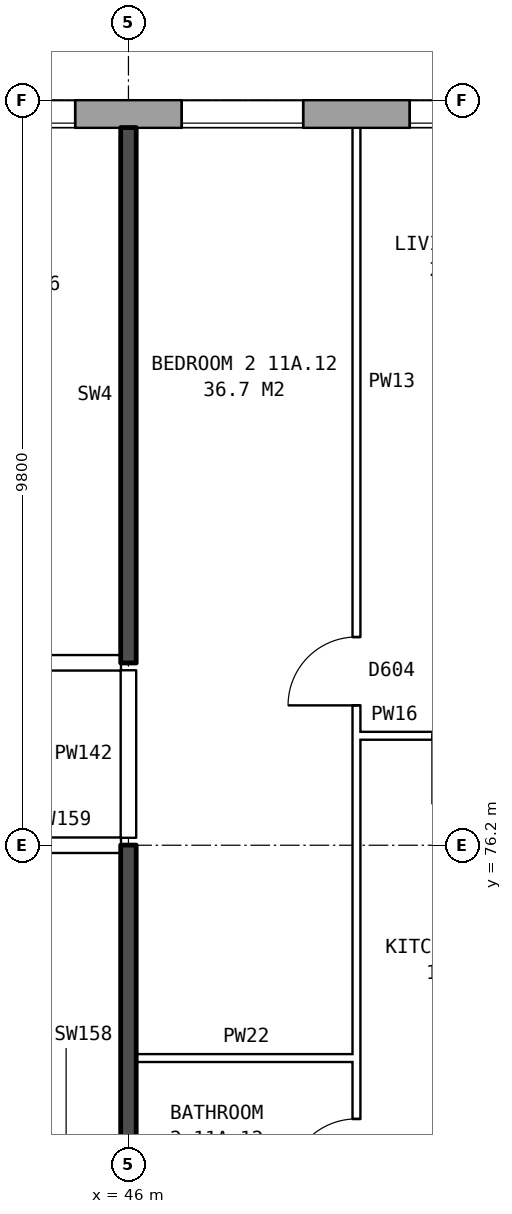
"""IFC4 building model, lengths in metres.
Left out: names, types, materials, properties, quantities, classifications, styles, units other than length and angle.
Written with IfcOpenShell. Run it as: python <this file> out.ifc"""

import sys

from ifc_helpers import new_model, si_unit, direction, frame, frame_2d, origin, place, context, subcontext, project, spatial, rectangle, extrude, element, fill, save


model = new_model("IFC4")
c1 = context("Model", 3, precision=1e-05, world=origin(), true_north=direction((0.0, 1.0)))
c2 = subcontext(c1, "Body", "Model", "MODEL_VIEW")
j1 = project(units=[si_unit("LENGTHUNIT", "METRE"), si_unit("PLANEANGLEUNIT", "RADIAN")], contexts=[c1])
p1 = place(None, origin())
s1 = spatial("IfcSite", under=j1, at=p1, CompositionType="ELEMENT")
p2 = place(p1, origin())
s2 = spatial("IfcBuilding", under=s1, at=p2, CompositionType="ELEMENT")
p3 = place(p2, frame((0.0, 0.0, 44.3)))
s3 = spatial("IfcBuildingStorey", under=s2, at=p3, CompositionType="ELEMENT", Elevation=44.3)
p4 = place(p3, frame((72.925, 85.82, 0.0), z_axis=(0.0, 0.0, 1.0), x_axis=(-1.0, 0.0, 0.0)))
e1 = element("IfcWall", 1, at=p4, inside=s3, PredefinedType="STANDARD", context=c2, shape_type="SweptSolid", body=[
    extrude(rectangle(XDim=48.351, YDim=0.36, at=frame_2d((24.175, 0.0))), origin(), (0.0, 0.0, 1.0), 2.85),
])
p5 = place(p4, frame((0.65, 0.0, 0.8)))
e2 = element("IfcOpeningElement", 2, at=p5, cuts=e1, PredefinedType="OPENING", context=c2, shape_type="SweptSolid", body=[
    extrude(rectangle(XDim=0.6, YDim=0.9, at=frame_2d((0.3, 0.45))), frame((0.0, 0.19, 0.0), z_axis=(0.0, -1.0, 0.0), x_axis=(1.0, 0.0, 0.0)), (0.0, 0.0, 1.0), 0.38),
])
p6 = place(p4, frame((3.625, 0.0, 0.8)))
e3 = element("IfcOpeningElement", 3, at=p6, cuts=e1, PredefinedType="OPENING", context=c2, shape_type="SweptSolid", body=[
    extrude(rectangle(XDim=1.6, YDim=1.8, at=frame_2d((0.8, 0.9))), frame((0.0, 0.19, 0.0), z_axis=(0.0, -1.0, 0.0), x_axis=(1.0, 0.0, 0.0)), (0.0, 0.0, 1.0), 0.38),
])
p7 = place(p4, frame((6.625, 0.0, 0.8)))
e4 = element("IfcOpeningElement", 4, at=p7, cuts=e1, PredefinedType="OPENING", context=c2, shape_type="SweptSolid", body=[
    extrude(rectangle(XDim=1.6, YDim=1.8, at=frame_2d((0.8, 0.9))), frame((0.0, 0.19, 0.0), z_axis=(0.0, -1.0, 0.0), x_axis=(1.0, 0.0, 0.0)), (0.0, 0.0, 1.0), 0.38),
])
p8 = place(p4, frame((9.625, 0.0, 0.8)))
e5 = element("IfcOpeningElement", 5, at=p8, cuts=e1, PredefinedType="OPENING", context=c2, shape_type="SweptSolid", body=[
    extrude(rectangle(XDim=1.6, YDim=1.8, at=frame_2d((0.8, 0.9))), frame((0.0, 0.19, 0.0), z_axis=(0.0, -1.0, 0.0), x_axis=(1.0, 0.0, 0.0)), (0.0, 0.0, 1.0), 0.38),
])
p9 = place(p4, frame((12.625, 0.0, 0.8)))
e6 = element("IfcOpeningElement", 6, at=p9, cuts=e1, PredefinedType="OPENING", context=c2, shape_type="SweptSolid", body=[
    extrude(rectangle(XDim=1.6, YDim=1.8, at=frame_2d((0.8, 0.9))), frame((0.0, 0.19, 0.0), z_axis=(0.0, -1.0, 0.0), x_axis=(1.0, 0.0, 0.0)), (0.0, 0.0, 1.0), 0.38),
])
p10 = place(p4, frame((15.625, 0.0, 0.8)))
e7 = element("IfcOpeningElement", 7, at=p10, cuts=e1, PredefinedType="OPENING", context=c2, shape_type="SweptSolid", body=[
    extrude(rectangle(XDim=1.6, YDim=1.8, at=frame_2d((0.8, 0.9))), frame((0.0, 0.19, 0.0), z_axis=(0.0, -1.0, 0.0), x_axis=(1.0, 0.0, 0.0)), (0.0, 0.0, 1.0), 0.38),
])
p11 = place(p4, frame((18.625, 0.0, 0.8)))
e8 = element("IfcOpeningElement", 8, at=p11, cuts=e1, PredefinedType="OPENING", context=c2, shape_type="SweptSolid", body=[
    extrude(rectangle(XDim=1.6, YDim=1.8, at=frame_2d((0.8, 0.9))), frame((0.0, 0.19, 0.0), z_axis=(0.0, -1.0, 0.0), x_axis=(1.0, 0.0, 0.0)), (0.0, 0.0, 1.0), 0.38),
])
p12 = place(p4, frame((21.625, 0.0, 0.8)))
e9 = element("IfcOpeningElement", 9, at=p12, cuts=e1, PredefinedType="OPENING", context=c2, shape_type="SweptSolid", body=[
    extrude(rectangle(XDim=1.6, YDim=1.8, at=frame_2d((0.8, 0.9))), frame((0.0, 0.19, 0.0), z_axis=(0.0, -1.0, 0.0), x_axis=(1.0, 0.0, 0.0)), (0.0, 0.0, 1.0), 0.38),
])
p13 = place(p4, frame((24.625, 0.0, 0.8)))
e10 = element("IfcOpeningElement", 10, at=p13, cuts=e1, PredefinedType="OPENING", context=c2, shape_type="SweptSolid", body=[
    extrude(rectangle(XDim=1.6, YDim=1.8, at=frame_2d((0.8, 0.9))), frame((0.0, 0.19, 0.0), z_axis=(0.0, -1.0, 0.0), x_axis=(1.0, 0.0, 0.0)), (0.0, 0.0, 1.0), 0.38),
])
p14 = place(p4, frame((27.625, 0.0, 0.8)))
e11 = element("IfcOpeningElement", 11, at=p14, cuts=e1, PredefinedType="OPENING", context=c2, shape_type="SweptSolid", body=[
    extrude(rectangle(XDim=1.6, YDim=1.8, at=frame_2d((0.8, 0.9))), frame((0.0, 0.19, 0.0), z_axis=(0.0, -1.0, 0.0), x_axis=(1.0, 0.0, 0.0)), (0.0, 0.0, 1.0), 0.38),
])
p15 = place(p4, frame((30.625, 0.0, 0.8)))
e12 = element("IfcOpeningElement", 12, at=p15, cuts=e1, PredefinedType="OPENING", context=c2, shape_type="SweptSolid", body=[
    extrude(rectangle(XDim=1.6, YDim=1.8, at=frame_2d((0.8, 0.9))), frame((0.0, 0.19, 0.0), z_axis=(0.0, -1.0, 0.0), x_axis=(1.0, 0.0, 0.0)), (0.0, 0.0, 1.0), 0.38),
])
p16 = place(p4, frame((33.625, 0.0, 0.8)))
e13 = element("IfcOpeningElement", 13, at=p16, cuts=e1, PredefinedType="OPENING", context=c2, shape_type="SweptSolid", body=[
    extrude(rectangle(XDim=1.6, YDim=1.8, at=frame_2d((0.8, 0.9))), frame((0.0, 0.19, 0.0), z_axis=(0.0, -1.0, 0.0), x_axis=(1.0, 0.0, 0.0)), (0.0, 0.0, 1.0), 0.38),
])
p17 = place(p4, frame((36.625, 0.0, 0.8)))
e14 = element("IfcOpeningElement", 14, at=p17, cuts=e1, PredefinedType="OPENING", context=c2, shape_type="SweptSolid", body=[
    extrude(rectangle(XDim=1.6, YDim=1.8, at=frame_2d((0.8, 0.9))), frame((0.0, 0.19, 0.0), z_axis=(0.0, -1.0, 0.0), x_axis=(1.0, 0.0, 0.0)), (0.0, 0.0, 1.0), 0.38),
])
p18 = place(p4, frame((39.625, 0.0, 0.8)))
e15 = element("IfcOpeningElement", 15, at=p18, cuts=e1, PredefinedType="OPENING", context=c2, shape_type="SweptSolid", body=[
    extrude(rectangle(XDim=1.6, YDim=1.8, at=frame_2d((0.8, 0.9))), frame((0.0, 0.19, 0.0), z_axis=(0.0, -1.0, 0.0), x_axis=(1.0, 0.0, 0.0)), (0.0, 0.0, 1.0), 0.38),
])
p19 = place(p4, frame((42.625, 0.0, 0.8)))
e16 = element("IfcOpeningElement", 16, at=p19, cuts=e1, PredefinedType="OPENING", context=c2, shape_type="SweptSolid", body=[
    extrude(rectangle(XDim=1.6, YDim=1.8, at=frame_2d((0.8, 0.9))), frame((0.0, 0.19, 0.0), z_axis=(0.0, -1.0, 0.0), x_axis=(1.0, 0.0, 0.0)), (0.0, 0.0, 1.0), 0.38),
])
p20 = place(p4, frame((45.125, 0.0, 0.8)))
e17 = element("IfcOpeningElement", 17, at=p20, cuts=e1, PredefinedType="OPENING", context=c2, shape_type="SweptSolid", body=[
    extrude(rectangle(XDim=1.2, YDim=1.8, at=frame_2d((0.6, 0.9))), frame((0.0, 0.19, 0.0), z_axis=(0.0, -1.0, 0.0), x_axis=(1.0, 0.0, 0.0)), (0.0, 0.0, 1.0), 0.38),
])
p21 = place(p4, frame((1.55, 0.0, 0.8)))
e18 = element("IfcOpeningElement", 18, at=p21, cuts=e1, PredefinedType="OPENING", context=c2, shape_type="SweptSolid", body=[
    extrude(rectangle(XDim=1.0, YDim=1.5, at=frame_2d((0.5, 0.75))), frame((0.0, 0.19, 0.0), z_axis=(0.0, -1.0, 0.0), x_axis=(1.0, 0.0, 0.0)), (0.0, 0.0, 1.0), 0.38),
])
p22 = place(p4, frame((46.625, 0.0, 0.8)))
e19 = element("IfcOpeningElement", 19, at=p22, cuts=e1, PredefinedType="OPENING", context=c2, shape_type="SweptSolid", body=[
    extrude(rectangle(XDim=1.0, YDim=0.9, at=frame_2d((0.5, 0.45))), frame((0.0, 0.19, 0.0), z_axis=(0.0, -1.0, 0.0), x_axis=(1.0, 0.0, 0.0)), (0.0, 0.0, 1.0), 0.38),
])
p23 = place(p3, frame((46.1, 73.4, 0.0), z_axis=(0.0, 0.0, 1.0), x_axis=(1.0, 0.0, 0.0)))
e20 = element("IfcWall", 20, at=p23, inside=s3, PredefinedType="PARTITIONING", context=c2, shape_type="SweptSolid", body=[
    extrude(rectangle(XDim=2.9, YDim=0.1, at=frame_2d((1.45, 0.0))), origin(), (0.0, 0.0, 1.0), 2.85),
])
p24 = place(p3, frame((44.36, 76.2, 0.0), z_axis=(0.0, 0.0, 1.0), x_axis=(1.0, 0.0, 0.0)))
e21 = element("IfcWall", 21, at=p24, inside=s3, PredefinedType="PARTITIONING", context=c2, shape_type="SweptSolid", body=[
    extrude(rectangle(XDim=1.54, YDim=0.2, at=frame_2d((0.77, 0.0))), origin(), (0.0, 0.0, 1.0), 2.85),
])
p25 = place(p3, frame((49.0, 77.64, 0.0), z_axis=(0.0, 0.0, 1.0), x_axis=(1.0, 0.0, 0.0)))
e22 = element("IfcWall", 22, at=p25, inside=s3, PredefinedType="PARTITIONING", context=c2, shape_type="SweptSolid", body=[
    extrude(rectangle(XDim=2.9, YDim=0.1, at=frame_2d((1.45, 0.0))), origin(), (0.0, 0.0, 1.0), 2.85),
])
p26 = place(p25, frame((1.0, 0.0, 0.0)))
e23 = element("IfcOpeningElement", 23, at=p26, cuts=e22, PredefinedType="OPENING", context=c2, shape_type="SweptSolid", body=[
    extrude(rectangle(XDim=0.9, YDim=2.1, at=frame_2d((0.45, 1.05))), frame((0.0, 0.06, 0.0), z_axis=(0.0, -1.0, 0.0), x_axis=(1.0, 0.0, 0.0)), (0.0, 0.0, 1.0), 0.12),
])
p27 = place(p3, frame((21.86, 78.6, 0.0), z_axis=(0.0, 0.0, 1.0), x_axis=(1.0, 0.0, 0.0)))
e24 = element("IfcWall", 24, at=p27, inside=s3, PredefinedType="PARTITIONING", context=c2, shape_type="SweptSolid", body=[
    extrude(rectangle(XDim=24.04, YDim=0.2, at=frame_2d((12.02, 0.0))), origin(), (0.0, 0.0, 1.0), 2.85),
])
p28 = place(p27, frame((20.59, 0.0, 0.0)))
e25 = element("IfcOpeningElement", 25, at=p28, cuts=e24, PredefinedType="OPENING", context=c2, shape_type="SweptSolid", body=[
    extrude(rectangle(XDim=1.0, YDim=2.1, at=frame_2d((0.5, 1.05))), frame((0.0, 0.11, 0.0), z_axis=(0.0, -1.0, 0.0), x_axis=(1.0, 0.0, 0.0)), (0.0, 0.0, 1.0), 0.22),
])
p29 = place(p27, frame((8.64, 0.0, 0.0)))
e26 = element("IfcOpeningElement", 26, at=p29, cuts=e24, PredefinedType="OPENING", context=c2, shape_type="SweptSolid", body=[
    extrude(rectangle(XDim=1.0, YDim=2.1, at=frame_2d((0.5, 1.05))), frame((0.0, 0.11, 0.0), z_axis=(0.0, -1.0, 0.0), x_axis=(1.0, 0.0, 0.0)), (0.0, 0.0, 1.0), 0.22),
])
p30 = place(p27, frame((1.37, 0.0, 0.0)))
e27 = element("IfcOpeningElement", 27, at=p30, cuts=e24, PredefinedType="OPENING", context=c2, shape_type="SweptSolid", body=[
    extrude(rectangle(XDim=1.0, YDim=2.1, at=frame_2d((0.5, 1.05))), frame((0.0, 0.11, 0.0), z_axis=(0.0, -1.0, 0.0), x_axis=(1.0, 0.0, 0.0)), (0.0, 0.0, 1.0), 0.22),
])
p31 = place(p3, frame((46.0, 71.2, 0.0), z_axis=(0.0, 0.0, 1.0), x_axis=(0.0, 1.0, 0.0)))
e28 = element("IfcWall", 28, at=p31, inside=s3, PredefinedType="SOLIDWALL", context=c2, shape_type="SweptSolid", body=[
    extrude(rectangle(XDim=5.0, YDim=0.2, at=frame_2d((2.5, 0.0))), origin(), (0.0, 0.0, 1.0), 2.85),
])
p32 = place(p3, frame((46.0, 76.3, 0.0), z_axis=(0.0, 0.0, 1.0), x_axis=(0.0, 1.0, 0.0)))
e29 = element("IfcWall", 29, at=p32, inside=s3, PredefinedType="PARTITIONING", context=c2, shape_type="SweptSolid", body=[
    extrude(rectangle(XDim=2.2, YDim=0.2, at=frame_2d((1.1, 0.0))), origin(), (0.0, 0.0, 1.0), 2.85),
])
p33 = place(p3, frame((46.0, 78.6, 0.0), z_axis=(0.0, 0.0, 1.0), x_axis=(0.0, 1.0, 0.0)))
e30 = element("IfcWall", 30, at=p33, inside=s3, PredefinedType="SOLIDWALL", context=c2, shape_type="SweptSolid", body=[
    extrude(rectangle(XDim=7.04, YDim=0.2, at=frame_2d((3.52, 0.0))), origin(), (0.0, 0.0, 1.0), 2.85),
])
p34 = place(p3, frame((49.0, 71.3, 0.0), z_axis=(0.0, 0.0, 1.0), x_axis=(0.0, 1.0, 0.0)))
e31 = element("IfcWall", 31, at=p34, inside=s3, PredefinedType="PARTITIONING", context=c2, shape_type="SweptSolid", body=[
    extrude(rectangle(XDim=14.34, YDim=0.1, at=frame_2d((7.17, 0.0))), origin(), (0.0, 0.0, 1.0), 2.85),
])
p35 = place(p34, frame((6.74, 0.0, 0.0)))
e32 = element("IfcOpeningElement", 32, at=p35, cuts=e31, PredefinedType="OPENING", context=c2, shape_type="SweptSolid", body=[
    extrude(rectangle(XDim=0.9, YDim=2.1, at=frame_2d((0.45, 1.05))), frame((0.0, 0.06, 0.0), z_axis=(0.0, -1.0, 0.0), x_axis=(1.0, 0.0, 0.0)), (0.0, 0.0, 1.0), 0.12),
])
p36 = place(p34, frame((0.4, 0.0, 0.0)))
e33 = element("IfcOpeningElement", 33, at=p36, cuts=e31, PredefinedType="OPENING", context=c2, shape_type="SweptSolid", body=[
    extrude(rectangle(XDim=0.9, YDim=2.1, at=frame_2d((0.45, 1.05))), frame((0.0, 0.06, 0.0), z_axis=(0.0, -1.0, 0.0), x_axis=(1.0, 0.0, 0.0)), (0.0, 0.0, 1.0), 0.12),
])
p37 = place(p12, origin())
e34 = element("IfcWindow", 34, at=p37, inside=s3, PartitioningType="SINGLE_PANEL", PredefinedType="WINDOW", context=c2, shape_type="SweptSolid", body=[
    extrude(rectangle(XDim=1.6, YDim=1.8, at=frame_2d((0.8, 0.9))), frame((0.0, 0.15, 0.0), z_axis=(0.0, -1.0, 0.0), x_axis=(1.0, 0.0, 0.0)), (0.0, 0.0, 1.0), 0.06),
])
fill(e9, e34)
p38 = place(p13, origin())
e35 = element("IfcWindow", 35, at=p38, inside=s3, PartitioningType="SINGLE_PANEL", PredefinedType="WINDOW", context=c2, shape_type="SweptSolid", body=[
    extrude(rectangle(XDim=1.6, YDim=1.8, at=frame_2d((0.8, 0.9))), frame((0.0, 0.15, 0.0), z_axis=(0.0, -1.0, 0.0), x_axis=(1.0, 0.0, 0.0)), (0.0, 0.0, 1.0), 0.06),
])
fill(e10, e35)
p39 = place(p14, origin())
e36 = element("IfcWindow", 36, at=p39, inside=s3, PartitioningType="SINGLE_PANEL", PredefinedType="WINDOW", context=c2, shape_type="SweptSolid", body=[
    extrude(rectangle(XDim=1.6, YDim=1.8, at=frame_2d((0.8, 0.9))), frame((0.0, 0.15, 0.0), z_axis=(0.0, -1.0, 0.0), x_axis=(1.0, 0.0, 0.0)), (0.0, 0.0, 1.0), 0.06),
])
fill(e11, e36)
p40 = place(p35, origin())
e37 = element("IfcDoor", 37, at=p40, inside=s3, OperationType="SINGLE_SWING_LEFT", PredefinedType="DOOR", context=c2, shape_type="SweptSolid", body=[
    extrude(rectangle(XDim=0.9, YDim=2.1, at=frame_2d((0.45, 1.05))), frame((0.0, 0.025, 0.0), z_axis=(0.0, -1.0, 0.0), x_axis=(1.0, 0.0, 0.0)), (0.0, 0.0, 1.0), 0.05),
])
fill(e32, e37)
p41 = place(p36, origin())
e38 = element("IfcDoor", 38, at=p41, inside=s3, OperationType="SINGLE_SWING_LEFT", PredefinedType="DOOR", context=c2, shape_type="SweptSolid", body=[
    extrude(rectangle(XDim=0.9, YDim=2.1, at=frame_2d((0.45, 1.05))), frame((0.0, 0.025, 0.0), z_axis=(0.0, -1.0, 0.0), x_axis=(1.0, 0.0, 0.0)), (0.0, 0.0, 1.0), 0.05),
])
fill(e33, e38)
save(model, sys.argv[1])
